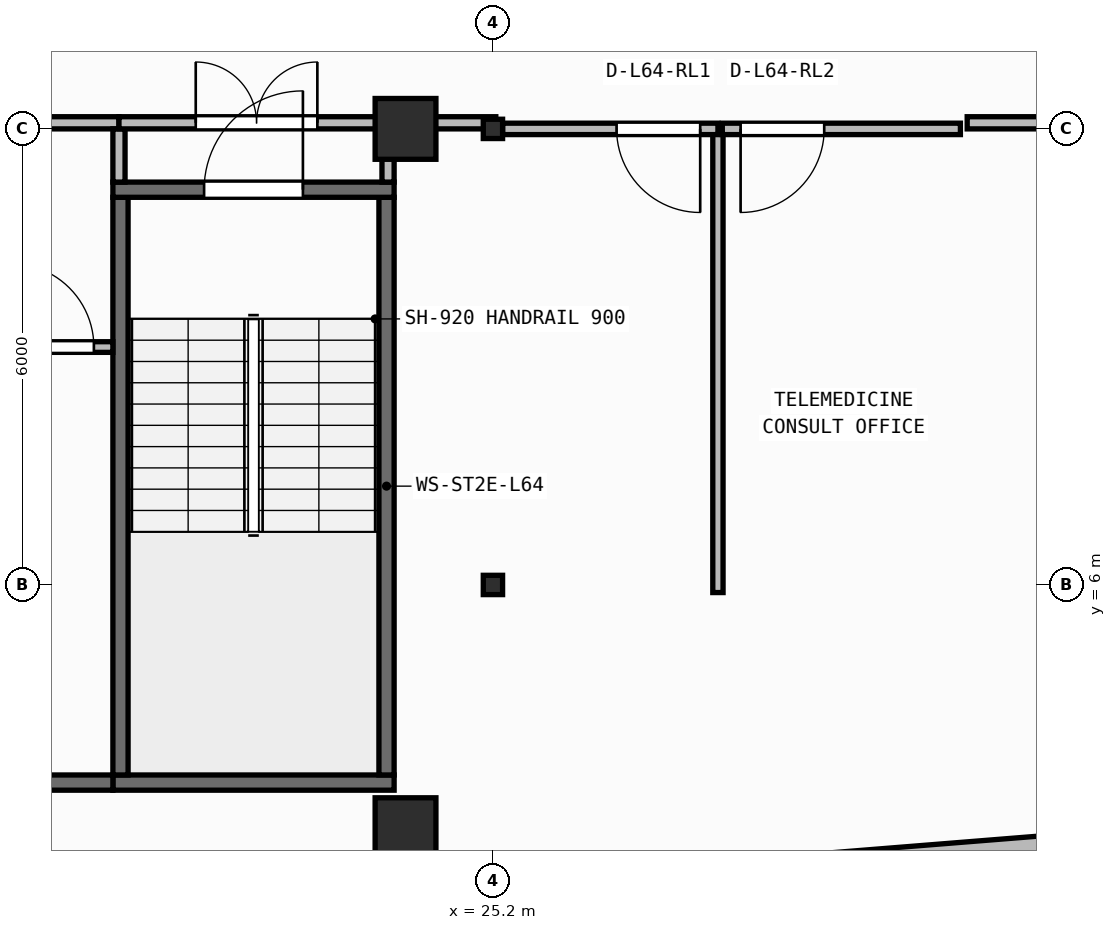
"""IFC4 building model, lengths in metres.
Left out: names, types, materials, properties, quantities, classifications, styles, units other than length and angle.
Written with IfcOpenShell. Run it as: python <this file> out.ifc"""

import sys

from ifc_helpers import new_model, si_unit, direction, frame, frame_2d, origin, origin_2d, place, context, subcontext, project, spatial, rectangle, i_section, extrude, element, fill, save


model = new_model("IFC4")
c1 = context("Model", 3, precision=1e-05, world=origin(), true_north=direction((0.0, 1.0)))
c2 = subcontext(c1, "Body", "Model", "MODEL_VIEW")
j1 = project(units=[si_unit("LENGTHUNIT", "METRE"), si_unit("PLANEANGLEUNIT", "RADIAN")], contexts=[c1])
p1 = place(None, origin())
s1 = spatial("IfcSite", under=j1, at=p1, CompositionType="ELEMENT")
p2 = place(p1, origin())
s2 = spatial("IfcBuilding", under=s1, at=p2, CompositionType="ELEMENT")
p3 = place(p2, frame((0.0, 0.0, 260.5)))
s3 = spatial("IfcBuildingStorey", under=s2, at=p3, CompositionType="ELEMENT", Elevation=260.5)
p4 = place(p3, frame((24.05, 2.8, 0.0), z_axis=(0.0, 0.0, 1.0), x_axis=(1.0, 0.0, 0.0)))
e1 = element("IfcColumn", 1, at=p4, inside=s3, PredefinedType="COLUMN", context=c2, shape_type="SweptSolid", body=[
    extrude(rectangle(XDim=0.8, YDim=0.8, at=origin_2d()), origin(), (0.0, 0.0, 1.0), 3.95),
])
p5 = place(p3, frame((25.2, 6.0, 0.0), z_axis=(0.0, 0.0, 1.0), x_axis=(1.0, 0.0, 0.0)))
e2 = element("IfcColumn", 2, at=p5, inside=s3, PredefinedType="COLUMN", context=c2, shape_type="SweptSolid", body=[
    extrude(i_section(OverallWidth=0.254, OverallDepth=0.254, WebThickness=0.009, FlangeThickness=0.014, FilletRadius=0.013, at=origin_2d()), origin(), (0.0, 0.0, 1.0), 3.95),
])
p6 = place(p3, frame((24.05, 12.0, 0.0), z_axis=(0.0, 0.0, 1.0), x_axis=(1.0, 0.0, 0.0)))
e3 = element("IfcColumn", 3, at=p6, inside=s3, PredefinedType="COLUMN", context=c2, shape_type="SweptSolid", body=[
    extrude(rectangle(XDim=0.8, YDim=0.8, at=origin_2d()), origin(), (0.0, 0.0, 1.0), 3.95),
])
p7 = place(p3, frame((25.2, 12.0, 0.0), z_axis=(0.0, 0.0, 1.0), x_axis=(1.0, 0.0, 0.0)))
e4 = element("IfcColumn", 4, at=p7, inside=s3, PredefinedType="COLUMN", context=c2, shape_type="SweptSolid", body=[
    extrude(i_section(OverallWidth=0.254, OverallDepth=0.254, WebThickness=0.009, FlangeThickness=0.014, FilletRadius=0.013, at=origin_2d()), origin(), (0.0, 0.0, 1.0), 3.95),
])
p8 = place(p3, frame((2.56, 0.173, 0.0), z_axis=(0.0, 0.0, 1.0), x_axis=(0.996798206282, 0.079958338856, 0.0)))
e5 = element("IfcWall", 5, at=p8, inside=s3, PredefinedType="STANDARD", context=c2, shape_type="SweptSolid", body=[
    extrude(rectangle(XDim=37.199, YDim=0.26, at=frame_2d((18.6, 0.0))), origin(), (0.0, 0.0, 1.0), 3.71),
])
p9 = place(p8, frame((17.4, 0.0, 0.9)))
e6 = element("IfcOpeningElement", 6, at=p9, cuts=e5, PredefinedType="OPENING", context=c2, shape_type="SweptSolid", body=[
    extrude(rectangle(XDim=2.4, YDim=1.65, at=frame_2d((1.2, 0.825))), frame((0.0, 0.14, 0.0), z_axis=(0.0, -1.0, 0.0), x_axis=(1.0, 0.0, 0.0)), (0.0, 0.0, 1.0), 0.28),
])
p10 = place(p3, frame((20.2, 3.4, 0.0), z_axis=(0.0, 0.0, 1.0), x_axis=(1.0, 0.0, 0.0)))
e7 = element("IfcWall", 7, at=p10, inside=s3, PredefinedType="SHEAR", context=c2, shape_type="SweptSolid", body=[
    extrude(rectangle(XDim=3.7, YDim=0.2, at=frame_2d((1.85, 0.0))), origin(), (0.0, 0.0, 1.0), 3.71),
])
for number, where, z_axis, x_axis in (
    (8, (20.3, 3.5, 0.0), (0.0, 0.0, 1.0), (0.0, 1.0, 0.0)),
    (9, (23.8, 3.5, 0.0), (0.0, 0.0, 1.0), (0.0, 1.0, 0.0)),
):
    element("IfcWall", number, at=place(p3, frame(where, z_axis=z_axis, x_axis=x_axis)), inside=s3, PredefinedType="SHEAR", context=c2, shape_type="SweptSolid", body=[
        extrude(rectangle(XDim=7.6, YDim=0.2, at=frame_2d((3.8, 0.0))), origin(), (0.0, 0.0, 1.0), 3.71),
    ])
p11 = place(p3, frame((20.2, 11.2, 0.0), z_axis=(0.0, 0.0, 1.0), x_axis=(1.0, 0.0, 0.0)))
e10 = element("IfcWall", 10, at=p11, inside=s3, PredefinedType="SHEAR", context=c2, shape_type="SweptSolid", body=[
    extrude(rectangle(XDim=3.7, YDim=0.2, at=frame_2d((1.85, 0.0))), origin(), (0.0, 0.0, 1.0), 3.71),
])
p12 = place(p11, frame((1.2, 0.0, 0.0)))
e11 = element("IfcOpeningElement", 11, at=p12, cuts=e10, PredefinedType="OPENING", context=c2, shape_type="SweptSolid", body=[
    extrude(rectangle(XDim=1.3, YDim=2.15, at=frame_2d((0.65, 1.075))), frame((0.0, 0.11, 0.0), z_axis=(0.0, -1.0, 0.0), x_axis=(1.0, 0.0, 0.0)), (0.0, 0.0, 1.0), 0.22),
])
p13 = place(p3, frame((6.5, 3.4, 0.0), z_axis=(0.0, 0.0, 1.0), x_axis=(1.0, 0.0, 0.0)))
e12 = element("IfcWall", 12, at=p13, inside=s3, PredefinedType="SHEAR", context=c2, shape_type="SweptSolid", body=[
    extrude(rectangle(XDim=13.7, YDim=0.2, at=frame_2d((6.85, 0.0))), origin(), (0.0, 0.0, 1.0), 3.71),
])
p14 = place(p3, frame((18.61, 9.13, 0.0), z_axis=(0.0, 0.0, 1.0), x_axis=(1.0, 0.0, 0.0)))
e13 = element("IfcWall", 13, at=p14, inside=s3, PredefinedType="PARTITIONING", context=c2, shape_type="SweptSolid", body=[
    extrude(rectangle(XDim=1.59, YDim=0.14, at=frame_2d((0.795, 0.0))), origin(), (0.0, 0.0, 1.0), 3.71),
])
p15 = place(p14, frame((0.24, 0.0, 0.0)))
e14 = element("IfcOpeningElement", 14, at=p15, cuts=e13, PredefinedType="OPENING", context=c2, shape_type="SweptSolid", body=[
    extrude(rectangle(XDim=1.1, YDim=2.1, at=frame_2d((0.55, 1.05))), frame((0.0, 0.08, 0.0), z_axis=(0.0, -1.0, 0.0), x_axis=(1.0, 0.0, 0.0)), (0.0, 0.0, 1.0), 0.16),
])
p16 = place(p3, frame((12.58, 12.08, 0.0), z_axis=(0.0, 0.0, 1.0), x_axis=(1.0, 0.0, 0.0)))
e15 = element("IfcWall", 15, at=p16, inside=s3, PredefinedType="PARTITIONING", context=c2, shape_type="SweptSolid", body=[
    extrude(rectangle(XDim=7.7, YDim=0.16, at=frame_2d((3.85, 0.0))), origin(), (0.0, 0.0, 1.0), 3.157),
])
p17 = place(p16, frame((3.05, 0.0, 0.0)))
e16 = element("IfcOpeningElement", 16, at=p17, cuts=e15, PredefinedType="OPENING", context=c2, shape_type="SweptSolid", body=[
    extrude(rectangle(XDim=1.6, YDim=2.05, at=frame_2d((0.8, 1.025))), frame((0.0, 0.09, 0.0), z_axis=(0.0, -1.0, 0.0), x_axis=(1.0, 0.0, 0.0)), (0.0, 0.0, 1.0), 0.18),
])
p18 = place(p3, frame((20.28, 11.3, 0.0), z_axis=(0.0, 0.0, 1.0), x_axis=(0.0, 1.0, 0.0)))
e17 = element("IfcWall", 17, at=p18, inside=s3, PredefinedType="PARTITIONING", context=c2, shape_type="SweptSolid", body=[
    extrude(rectangle(XDim=0.7, YDim=0.16, at=frame_2d((0.35, 0.0))), origin(), (0.0, 0.0, 1.0), 3.71),
])
p19 = place(p3, frame((20.28, 12.08, 0.0), z_axis=(0.0, 0.0, 1.0), x_axis=(1.0, 0.0, 0.0)))
e18 = element("IfcWall", 18, at=p19, inside=s3, PredefinedType="PARTITIONING", context=c2, shape_type="SweptSolid", body=[
    extrude(rectangle(XDim=3.62, YDim=0.16, at=frame_2d((1.81, 0.0))), origin(), (0.0, 0.0, 1.0), 3.157),
])
p20 = place(p19, frame((1.01, 0.0, 0.0)))
e19 = element("IfcOpeningElement", 19, at=p20, cuts=e18, PredefinedType="OPENING", context=c2, shape_type="SweptSolid", body=[
    extrude(rectangle(XDim=1.6, YDim=2.05, at=frame_2d((0.8, 1.025))), frame((0.0, 0.09, 0.0), z_axis=(0.0, -1.0, 0.0), x_axis=(1.0, 0.0, 0.0)), (0.0, 0.0, 1.0), 0.18),
])
p21 = place(p3, frame((23.82, 11.3, 0.0), z_axis=(0.0, 0.0, 1.0), x_axis=(0.0, 1.0, 0.0)))
e20 = element("IfcWall", 20, at=p21, inside=s3, PredefinedType="PARTITIONING", context=c2, shape_type="SweptSolid", body=[
    extrude(rectangle(XDim=0.7, YDim=0.16, at=frame_2d((0.35, 0.0))), origin(), (0.0, 0.0, 1.0), 3.71),
])
p22 = place(p3, frame((28.16, 5.9, 0.0), z_axis=(0.0, 0.0, 1.0), x_axis=(0.0, 1.0, 0.0)))
e21 = element("IfcWall", 21, at=p22, inside=s3, PredefinedType="PARTITIONING", context=c2, shape_type="SweptSolid", body=[
    extrude(rectangle(XDim=6.1, YDim=0.135, at=frame_2d((3.05, 0.0))), origin(), (0.0, 0.0, 1.0), 3.71),
])
p23 = place(p3, frame((28.16, 12.0, 0.0), z_axis=(0.0, 0.0, 1.0), x_axis=(-1.0, 0.0, 0.0)))
e22 = element("IfcWall", 22, at=p23, inside=s3, PredefinedType="PARTITIONING", context=c2, shape_type="SweptSolid", body=[
    extrude(rectangle(XDim=2.833, YDim=0.15, at=frame_2d((1.417, 0.0))), origin(), (0.0, 0.0, 1.0), 3.157),
])
p24 = place(p23, frame((0.233, 0.0, 0.0)))
e23 = element("IfcOpeningElement", 23, at=p24, cuts=e22, PredefinedType="OPENING", context=c2, shape_type="SweptSolid", body=[
    extrude(rectangle(XDim=1.1, YDim=2.1, at=frame_2d((0.55, 1.05))), frame((0.0, 0.085, 0.0), z_axis=(0.0, -1.0, 0.0), x_axis=(1.0, 0.0, 0.0)), (0.0, 0.0, 1.0), 0.17),
])
p25 = place(p3, frame((31.35, 12.0, 0.0), z_axis=(0.0, 0.0, 1.0), x_axis=(-1.0, 0.0, 0.0)))
e24 = element("IfcWall", 24, at=p25, inside=s3, PredefinedType="PARTITIONING", context=c2, shape_type="SweptSolid", body=[
    extrude(rectangle(XDim=3.133, YDim=0.15, at=frame_2d((1.566, 0.0))), origin(), (0.0, 0.0, 1.0), 3.157),
])
p26 = place(p25, frame((1.792, 0.0, 0.0)))
e25 = element("IfcOpeningElement", 25, at=p26, cuts=e24, PredefinedType="OPENING", context=c2, shape_type="SweptSolid", body=[
    extrude(rectangle(XDim=1.1, YDim=2.1, at=frame_2d((0.55, 1.05))), frame((0.0, 0.085, 0.0), z_axis=(0.0, -1.0, 0.0), x_axis=(1.0, 0.0, 0.0)), (0.0, 0.0, 1.0), 0.17),
])
p27 = place(p3, frame((24.02, 12.08, 0.0), z_axis=(0.0, 0.0, 1.0), x_axis=(1.0, 0.0, 0.0)))
e26 = element("IfcWall", 26, at=p27, inside=s3, PredefinedType="PARTITIONING", context=c2, shape_type="SweptSolid", body=[
    extrude(rectangle(XDim=1.218, YDim=0.16, at=frame_2d((0.609, 0.0))), origin(), (0.0, 0.0, 1.0), 3.157),
])
p28 = place(p3, frame((31.439, 12.08, 0.0), z_axis=(0.0, 0.0, 1.0), x_axis=(1.0, 0.0, 0.0)))
e27 = element("IfcWall", 27, at=p28, inside=s3, PredefinedType="PARTITIONING", context=c2, shape_type="SweptSolid", body=[
    extrude(rectangle(XDim=2.198, YDim=0.16, at=frame_2d((1.099, 0.0))), origin(), (0.0, 0.0, 1.0), 3.157),
])
p29 = place(p12, origin())
e28 = element("IfcDoor", 28, at=p29, inside=s3, OperationType="SINGLE_SWING_RIGHT", PredefinedType="DOOR", context=c2, shape_type="SweptSolid", body=[
    extrude(rectangle(XDim=1.3, YDim=2.15, at=frame_2d((0.65, 1.075))), frame((0.0, 0.025, 0.0), z_axis=(0.0, -1.0, 0.0), x_axis=(1.0, 0.0, 0.0)), (0.0, 0.0, 1.0), 0.05),
])
fill(e11, e28)
p30 = place(p15, origin())
e29 = element("IfcDoor", 29, at=p30, inside=s3, OperationType="SINGLE_SWING_LEFT", PredefinedType="DOOR", context=c2, shape_type="SweptSolid", body=[
    extrude(rectangle(XDim=1.1, YDim=2.1, at=frame_2d((0.55, 1.05))), frame((0.0, 0.025, 0.0), z_axis=(0.0, -1.0, 0.0), x_axis=(1.0, 0.0, 0.0)), (0.0, 0.0, 1.0), 0.05),
])
fill(e14, e29)
p31 = place(p20, origin())
e30 = element("IfcDoor", 30, at=p31, inside=s3, OperationType="DOUBLE_DOOR_SINGLE_SWING", PredefinedType="DOOR", context=c2, shape_type="SweptSolid", body=[
    extrude(rectangle(XDim=1.6, YDim=2.05, at=frame_2d((0.8, 1.025))), frame((0.0, 0.025, 0.0), z_axis=(0.0, -1.0, 0.0), x_axis=(1.0, 0.0, 0.0)), (0.0, 0.0, 1.0), 0.05),
])
fill(e19, e30)
p32 = place(p24, origin())
e31 = element("IfcDoor", 31, at=p32, inside=s3, OperationType="SINGLE_SWING_LEFT", PredefinedType="DOOR", context=c2, shape_type="SweptSolid", body=[
    extrude(rectangle(XDim=1.1, YDim=2.1, at=frame_2d((0.55, 1.05))), frame((0.0, 0.025, 0.0), z_axis=(0.0, -1.0, 0.0), x_axis=(1.0, 0.0, 0.0)), (0.0, 0.0, 1.0), 0.05),
])
fill(e23, e31)
p33 = place(p26, origin())
e32 = element("IfcDoor", 32, at=p33, inside=s3, OperationType="SINGLE_SWING_RIGHT", PredefinedType="DOOR", context=c2, shape_type="SweptSolid", body=[
    extrude(rectangle(XDim=1.1, YDim=2.1, at=frame_2d((0.55, 1.05))), frame((0.0, 0.025, 0.0), z_axis=(0.0, -1.0, 0.0), x_axis=(1.0, 0.0, 0.0)), (0.0, 0.0, 1.0), 0.05),
])
fill(e25, e32)
save(model, sys.argv[1])
